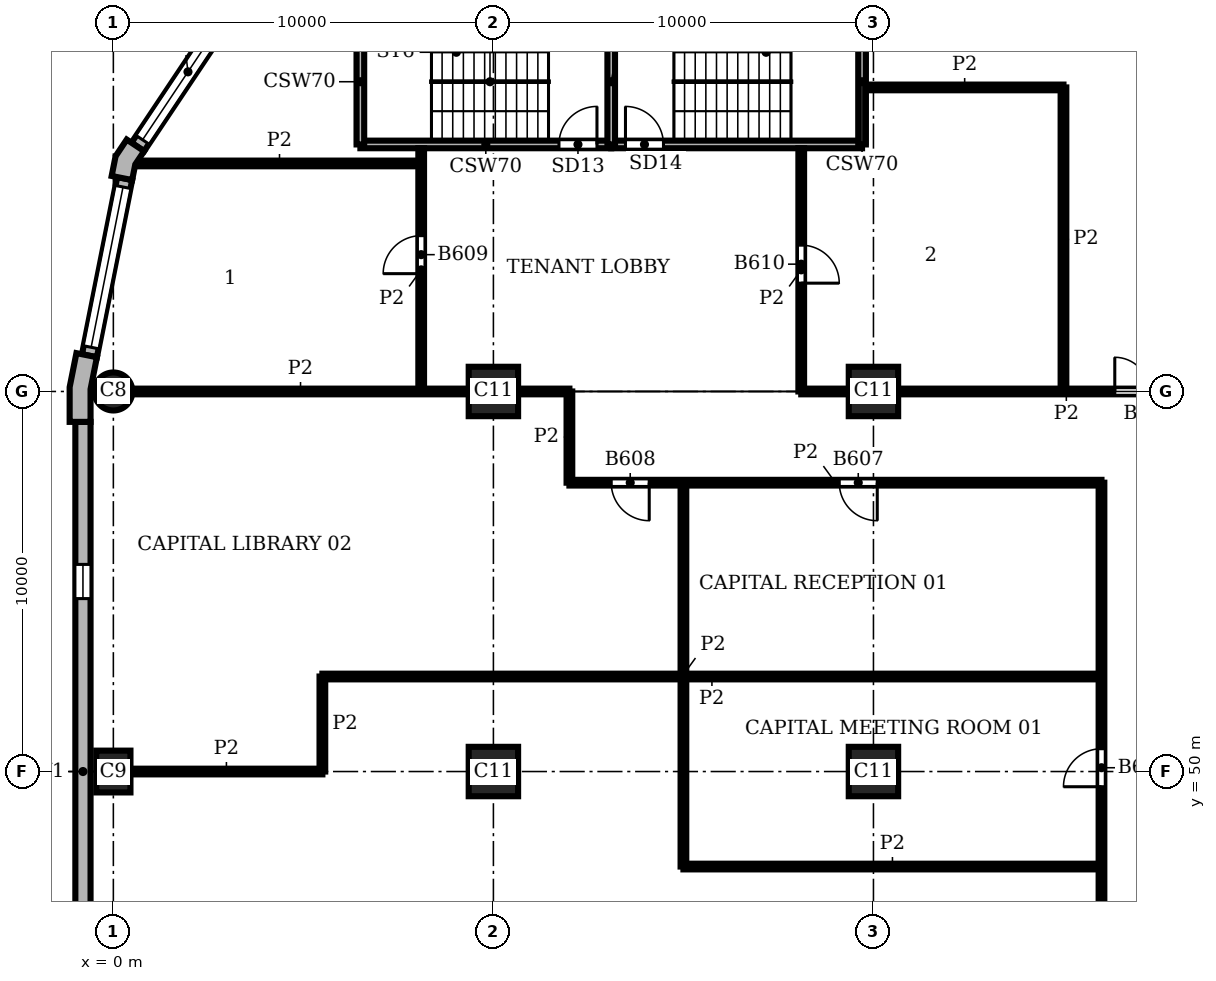
"""IFC4 building model, lengths in metres.
Left out: names, types, materials, properties, quantities, classifications, styles, units other than length and angle.
Written with IfcOpenShell. Run it as: python <this file> out.ifc"""

import sys

from ifc_helpers import new_model, si_unit, direction, frame, frame_2d, origin, origin_2d, place, context, subcontext, project, spatial, polyline, rectangle, circle, outline, extrude, element, fill, save


model = new_model("IFC4")
c1 = context("Model", 3, precision=1e-05, world=origin(), true_north=direction((0.0, 1.0)))
c2 = subcontext(c1, "Body", "Model", "MODEL_VIEW")
j1 = project(units=[si_unit("LENGTHUNIT", "METRE"), si_unit("PLANEANGLEUNIT", "RADIAN")], contexts=[c1])
p1 = place(None, origin())
s1 = spatial("IfcSite", under=j1, at=p1, CompositionType="ELEMENT")
p2 = place(p1, origin())
s2 = spatial("IfcBuilding", under=s1, at=p2, CompositionType="ELEMENT")
p3 = place(p2, frame((0.0, 0.0, 190.2)))
s3 = spatial("IfcBuildingStorey", under=s2, at=p3, CompositionType="ELEMENT", Elevation=190.2)
p4 = place(p3, frame((0.0, 60.0, 0.0), z_axis=(0.0, 0.0, 1.0), x_axis=(1.0, 0.0, 0.0)))
e1 = element("IfcColumn", 1, at=p4, inside=s3, PredefinedType="COLUMN", context=c2, shape_type="SweptSolid", body=[
    extrude(circle(Radius=0.5, at=origin_2d()), origin(), (0.0, 0.0, 1.0), 3.9),
])
p5 = place(p3, frame((0.0, 50.0, 0.0), z_axis=(0.0, 0.0, 1.0), x_axis=(0.0, 1.0, 0.0)))
e2 = element("IfcColumn", 2, at=p5, inside=s3, PredefinedType="COLUMN", context=c2, shape_type="SweptSolid", body=[
    extrude(rectangle(XDim=1.1, YDim=0.9, at=origin_2d()), origin(), (0.0, 0.0, 1.0), 3.9),
])
for number, where, z_axis, x_axis in (
    (3, (10.0, 50.0, 0.0), (0.0, 0.0, 1.0), (1.0, 0.0, 0.0)),
    (4, (10.0, 60.0, 0.0), (0.0, 0.0, 1.0), (1.0, 0.0, 0.0)),
    (5, (20.0, 50.0, 0.0), (0.0, 0.0, 1.0), (1.0, 0.0, 0.0)),
    (6, (20.0, 60.0, 0.0), (0.0, 0.0, 1.0), (1.0, 0.0, 0.0)),
):
    element("IfcColumn", number, at=place(p3, frame(where, z_axis=z_axis, x_axis=x_axis)), inside=s3, PredefinedType="COLUMN", context=c2, shape_type="SweptSolid", body=[
        extrude(rectangle(XDim=1.3, YDim=1.3, at=origin_2d()), origin(), (0.0, 0.0, 1.0), 3.9),
    ])
p6 = place(p3, origin())
e7 = element("IfcWall", 7, at=p6, inside=s3, PredefinedType="SOLIDWALL", context=c2, shape_type="SweptSolid", body=[
    extrude(outline(polyline([(0.477, 66.545), (0.352, 66.629), (0.059, 66.189), (-0.045, 65.67), (0.103, 65.641), (0.495, 65.563), (0.577, 65.974), (0.81, 66.323), (0.477, 66.545)])), origin(), (0.0, 0.0, 1.0), 3.9),
])
e8 = element("IfcWall", 8, at=p6, inside=s3, PredefinedType="SOLIDWALL", context=c2, shape_type="SweptSolid", body=[
    extrude(outline(polyline([(-0.825, 60.98), (-0.972, 61.009), (-1.15, 60.113), (-1.15, 59.2), (-1.0, 59.2), (-0.6, 59.2), (-0.6, 60.059), (-0.432, 60.902), (-0.825, 60.98)])), origin(), (0.0, 0.0, 1.0), 3.9),
])
p7 = place(p3, frame((29.357, 66.434, 0.0), z_axis=(0.0, 0.0, 1.0), x_axis=(-0.555541552266, 0.831488775454, 0.0)))
e9 = element("IfcWall", 9, at=p7, inside=s3, PredefinedType="SOLIDWALL", context=c2, shape_type="SweptSolid", body=[
    extrude(rectangle(XDim=4.753, YDim=0.4, at=frame_2d((2.376, 0.0))), origin(), (0.0, 0.0, 1.0), 3.9),
])
p8 = place(p7, frame((0.226, 0.0, 0.9)))
e10 = element("IfcOpeningElement", 10, at=p8, cuts=e9, PredefinedType="OPENING", context=c2, shape_type="SweptSolid", body=[
    extrude(rectangle(XDim=4.3, YDim=2.35, at=frame_2d((2.15, 1.175))), frame((0.0, 0.21, 0.0), z_axis=(0.0, -1.0, 0.0), x_axis=(1.0, 0.0, 0.0)), (0.0, 0.0, 1.0), 0.42),
])
p9 = place(p3, frame((3.284, 70.386, 0.0), z_axis=(0.0, 0.0, 1.0), x_axis=(-0.555541552266, -0.831488775454, 0.0)))
e11 = element("IfcWall", 11, at=p9, inside=s3, PredefinedType="SOLIDWALL", context=c2, shape_type="SweptSolid", body=[
    extrude(rectangle(XDim=4.753, YDim=0.4, at=frame_2d((2.376, 0.0))), origin(), (0.0, 0.0, 1.0), 3.9),
])
p10 = place(p9, frame((0.226, 0.0, 0.9)))
e12 = element("IfcOpeningElement", 12, at=p10, cuts=e11, PredefinedType="OPENING", context=c2, shape_type="SweptSolid", body=[
    extrude(rectangle(XDim=4.3, YDim=2.35, at=frame_2d((2.15, 1.175))), frame((0.0, 0.21, 0.0), z_axis=(0.0, -1.0, 0.0), x_axis=(1.0, 0.0, 0.0)), (0.0, 0.0, 1.0), 0.42),
])
p11 = place(p3, frame((0.299, 65.602, 0.0), z_axis=(0.0, 0.0, 1.0), x_axis=(-0.195098533057, -0.98078364709, 0.0)))
e13 = element("IfcWall", 13, at=p11, inside=s3, PredefinedType="SOLIDWALL", context=c2, shape_type="SweptSolid", body=[
    extrude(rectangle(XDim=4.753, YDim=0.4, at=frame_2d((2.376, 0.0))), origin(), (0.0, 0.0, 1.0), 3.9),
])
p12 = place(p11, frame((0.226, 0.0, 0.9)))
e14 = element("IfcOpeningElement", 14, at=p12, cuts=e13, PredefinedType="OPENING", context=c2, shape_type="SweptSolid", body=[
    extrude(rectangle(XDim=4.3, YDim=2.35, at=frame_2d((2.15, 1.175))), frame((0.0, 0.21, 0.0), z_axis=(0.0, -1.0, 0.0), x_axis=(1.0, 0.0, 0.0)), (0.0, 0.0, 1.0), 0.42),
])
p13 = place(p3, frame((-0.8, 59.2, 0.0), z_axis=(0.0, 0.0, 1.0), x_axis=(0.0, -1.0, 0.0)))
e15 = element("IfcWall", 15, at=p13, inside=s3, PredefinedType="SOLIDWALL", context=c2, shape_type="SweptSolid", body=[
    extrude(rectangle(XDim=18.4, YDim=0.4, at=frame_2d((9.2, 0.0))), origin(), (0.0, 0.0, 1.0), 3.9),
])
p14 = place(p13, frame((3.75, 0.0, 0.9)))
e16 = element("IfcOpeningElement", 16, at=p14, cuts=e15, PredefinedType="OPENING", context=c2, shape_type="SweptSolid", body=[
    extrude(rectangle(XDim=0.9, YDim=2.35, at=frame_2d((0.45, 1.175))), frame((0.0, 0.21, 0.0), z_axis=(0.0, -1.0, 0.0), x_axis=(1.0, 0.0, 0.0)), (0.0, 0.0, 1.0), 0.42),
])
p15 = place(p13, frame((13.75, 0.0, 0.9)))
e17 = element("IfcOpeningElement", 17, at=p15, cuts=e15, PredefinedType="OPENING", context=c2, shape_type="SweptSolid", body=[
    extrude(rectangle(XDim=0.9, YDim=2.35, at=frame_2d((0.45, 1.175))), frame((0.0, 0.21, 0.0), z_axis=(0.0, -1.0, 0.0), x_axis=(1.0, 0.0, 0.0)), (0.0, 0.0, 1.0), 0.42),
])
p16 = place(p3, frame((6.5, 66.5, 0.0), z_axis=(0.0, 0.0, 1.0), x_axis=(1.0, 0.0, 0.0)))
e18 = element("IfcWall", 18, at=p16, inside=s3, PredefinedType="SHEAR", context=c2, shape_type="SweptSolid", body=[
    extrude(rectangle(XDim=6.6, YDim=0.2, at=frame_2d((3.3, 0.0))), origin(), (0.0, 0.0, 1.0), 3.58),
])
p17 = place(p16, frame((5.225, 0.0, 0.0)))
e19 = element("IfcOpeningElement", 19, at=p17, cuts=e18, PredefinedType="OPENING", context=c2, shape_type="SweptSolid", body=[
    extrude(rectangle(XDim=1.0, YDim=2.1, at=frame_2d((0.5, 1.05))), frame((0.0, 0.11, 0.0), z_axis=(0.0, -1.0, 0.0), x_axis=(1.0, 0.0, 0.0)), (0.0, 0.0, 1.0), 0.22),
])
p18 = place(p3, frame((13.1, 66.5, 0.0), z_axis=(0.0, 0.0, 1.0), x_axis=(1.0, 0.0, 0.0)))
e20 = element("IfcWall", 20, at=p18, inside=s3, PredefinedType="SHEAR", context=c2, shape_type="SweptSolid", body=[
    extrude(rectangle(XDim=6.6, YDim=0.2, at=frame_2d((3.3, 0.0))), origin(), (0.0, 0.0, 1.0), 3.58),
])
p19 = place(p18, frame((0.375, 0.0, 0.0)))
e21 = element("IfcOpeningElement", 21, at=p19, cuts=e20, PredefinedType="OPENING", context=c2, shape_type="SweptSolid", body=[
    extrude(rectangle(XDim=1.0, YDim=2.1, at=frame_2d((0.5, 1.05))), frame((0.0, 0.11, 0.0), z_axis=(0.0, -1.0, 0.0), x_axis=(1.0, 0.0, 0.0)), (0.0, 0.0, 1.0), 0.22),
])
for number, where, z_axis, x_axis in (
    (22, (6.5, 66.5, 0.0), (0.0, 0.0, 1.0), (0.0, 1.0, 0.0)),
    (23, (13.1, 66.5, 0.0), (0.0, 0.0, 1.0), (0.0, 1.0, 0.0)),
    (24, (19.7, 66.5, 0.0), (0.0, 0.0, 1.0), (0.0, 1.0, 0.0)),
):
    element("IfcWall", number, at=place(p3, frame(where, z_axis=z_axis, x_axis=x_axis)), inside=s3, PredefinedType="SHEAR", context=c2, shape_type="SweptSolid", body=[
        extrude(rectangle(XDim=3.3, YDim=0.2, at=frame_2d((1.65, 0.0))), origin(), (0.0, 0.0, 1.0), 3.58),
    ])
p20 = place(p3, frame((5.5, 50.0, 0.0), z_axis=(0.0, 0.0, 1.0), x_axis=(0.0, 1.0, 0.0)))
e25 = element("IfcWall", 25, at=p20, inside=s3, PredefinedType="PARTITIONING", context=c2, shape_type="SweptSolid", body=[
    extrude(rectangle(XDim=2.5, YDim=0.15, at=frame_2d((1.25, 0.0))), origin(), (0.0, 0.0, 1.0), 3.58),
])
p21 = place(p3, frame((8.1, 60.0, 0.0), z_axis=(0.0, 0.0, 1.0), x_axis=(0.0, 1.0, 0.0)))
e26 = element("IfcWall", 26, at=p21, inside=s3, PredefinedType="PARTITIONING", context=c2, shape_type="SweptSolid", body=[
    extrude(rectangle(XDim=6.4, YDim=0.15, at=frame_2d((3.2, 0.0))), origin(), (0.0, 0.0, 1.0), 3.58),
])
p22 = place(p21, frame((3.1, 0.0, 0.0)))
e27 = element("IfcOpeningElement", 27, at=p22, cuts=e26, PredefinedType="OPENING", context=c2, shape_type="SweptSolid", body=[
    extrude(rectangle(XDim=1.0, YDim=2.1, at=frame_2d((0.5, 1.05))), frame((0.0, 0.085, 0.0), z_axis=(0.0, -1.0, 0.0), x_axis=(1.0, 0.0, 0.0)), (0.0, 0.0, 1.0), 0.17),
])
p23 = place(p3, frame((12.0, 57.6, 0.0), z_axis=(0.0, 0.0, 1.0), x_axis=(0.0, 1.0, 0.0)))
e28 = element("IfcWall", 28, at=p23, inside=s3, PredefinedType="PARTITIONING", context=c2, shape_type="SweptSolid", body=[
    extrude(rectangle(XDim=2.4, YDim=0.15, at=frame_2d((1.2, 0.0))), origin(), (0.0, 0.0, 1.0), 3.58),
])
p24 = place(p3, frame((15.0, 47.5, 0.0), z_axis=(0.0, 0.0, 1.0), x_axis=(0.0, 1.0, 0.0)))
e29 = element("IfcWall", 29, at=p24, inside=s3, PredefinedType="PARTITIONING", context=c2, shape_type="SweptSolid", body=[
    extrude(rectangle(XDim=10.1, YDim=0.15, at=frame_2d((5.05, 0.0))), origin(), (0.0, 0.0, 1.0), 3.58),
])
p25 = place(p3, frame((18.1, 60.0, 0.0), z_axis=(0.0, 0.0, 1.0), x_axis=(0.0, 1.0, 0.0)))
e30 = element("IfcWall", 30, at=p25, inside=s3, PredefinedType="PARTITIONING", context=c2, shape_type="SweptSolid", body=[
    extrude(rectangle(XDim=6.4, YDim=0.15, at=frame_2d((3.2, 0.0))), origin(), (0.0, 0.0, 1.0), 3.58),
])
p26 = place(p25, frame((2.85, 0.0, 0.0)))
e31 = element("IfcOpeningElement", 31, at=p26, cuts=e30, PredefinedType="OPENING", context=c2, shape_type="SweptSolid", body=[
    extrude(rectangle(XDim=1.0, YDim=2.1, at=frame_2d((0.5, 1.05))), frame((0.0, 0.085, 0.0), z_axis=(0.0, -1.0, 0.0), x_axis=(1.0, 0.0, 0.0)), (0.0, 0.0, 1.0), 0.17),
])
p27 = place(p3, frame((25.0, 60.0, 0.0), z_axis=(0.0, 0.0, 1.0), x_axis=(0.0, 1.0, 0.0)))
e32 = element("IfcWall", 32, at=p27, inside=s3, PredefinedType="PARTITIONING", context=c2, shape_type="SweptSolid", body=[
    extrude(rectangle(XDim=8.0, YDim=0.15, at=frame_2d((4.0, 0.0))), origin(), (0.0, 0.0, 1.0), 3.58),
])
p28 = place(p3, frame((26.0, 28.0, 0.0), z_axis=(0.0, 0.0, 1.0), x_axis=(0.0, 1.0, 0.0)))
e33 = element("IfcWall", 33, at=p28, inside=s3, PredefinedType="PARTITIONING", context=c2, shape_type="SweptSolid", body=[
    extrude(rectangle(XDim=29.6, YDim=0.15, at=frame_2d((14.8, 0.0))), origin(), (0.0, 0.0, 1.0), 3.58),
])
p29 = place(p28, frame((2.85, 0.0, 0.0)))
e34 = element("IfcOpeningElement", 34, at=p29, cuts=e33, PredefinedType="OPENING", context=c2, shape_type="SweptSolid", body=[
    extrude(rectangle(XDim=1.8, YDim=2.1, at=frame_2d((0.9, 1.05))), frame((0.0, 0.085, 0.0), z_axis=(0.0, -1.0, 0.0), x_axis=(1.0, 0.0, 0.0)), (0.0, 0.0, 1.0), 0.17),
])
p30 = place(p28, frame((12.6, 0.0, 0.0)))
e35 = element("IfcOpeningElement", 35, at=p30, cuts=e33, PredefinedType="OPENING", context=c2, shape_type="SweptSolid", body=[
    extrude(rectangle(XDim=1.8, YDim=2.1, at=frame_2d((0.9, 1.05))), frame((0.0, 0.085, 0.0), z_axis=(0.0, -1.0, 0.0), x_axis=(1.0, 0.0, 0.0)), (0.0, 0.0, 1.0), 0.17),
])
p31 = place(p28, frame((21.6, 0.0, 0.0)))
e36 = element("IfcOpeningElement", 36, at=p31, cuts=e33, PredefinedType="OPENING", context=c2, shape_type="SweptSolid", body=[
    extrude(rectangle(XDim=1.0, YDim=2.1, at=frame_2d((0.5, 1.05))), frame((0.0, 0.085, 0.0), z_axis=(0.0, -1.0, 0.0), x_axis=(1.0, 0.0, 0.0)), (0.0, 0.0, 1.0), 0.17),
])
p32 = place(p3, frame((15.0, 47.5, 0.0), z_axis=(0.0, 0.0, 1.0), x_axis=(1.0, 0.0, 0.0)))
e37 = element("IfcWall", 37, at=p32, inside=s3, PredefinedType="PARTITIONING", context=c2, shape_type="SweptSolid", body=[
    extrude(rectangle(XDim=11.0, YDim=0.15, at=frame_2d((5.5, 0.0))), origin(), (0.0, 0.0, 1.0), 3.58),
])
p33 = place(p3, frame((0.45, 50.0, 0.0), z_axis=(0.0, 0.0, 1.0), x_axis=(1.0, 0.0, 0.0)))
e38 = element("IfcWall", 38, at=p33, inside=s3, PredefinedType="PARTITIONING", context=c2, shape_type="SweptSolid", body=[
    extrude(rectangle(XDim=5.05, YDim=0.15, at=frame_2d((2.525, 0.0))), origin(), (0.0, 0.0, 1.0), 3.58),
])
p34 = place(p3, frame((5.5, 52.5, 0.0), z_axis=(0.0, 0.0, 1.0), x_axis=(1.0, 0.0, 0.0)))
e39 = element("IfcWall", 39, at=p34, inside=s3, PredefinedType="PARTITIONING", context=c2, shape_type="SweptSolid", body=[
    extrude(rectangle(XDim=20.5, YDim=0.15, at=frame_2d((10.25, 0.0))), origin(), (0.0, 0.0, 1.0), 3.58),
])
p35 = place(p3, frame((12.0, 57.6, 0.0), z_axis=(0.0, 0.0, 1.0), x_axis=(1.0, 0.0, 0.0)))
e40 = element("IfcWall", 40, at=p35, inside=s3, PredefinedType="PARTITIONING", context=c2, shape_type="SweptSolid", body=[
    extrude(rectangle(XDim=14.0, YDim=0.15, at=frame_2d((7.0, 0.0))), origin(), (0.0, 0.0, 1.0), 3.58),
])
p36 = place(p35, frame((7.1, 0.0, 0.0)))
e41 = element("IfcOpeningElement", 41, at=p36, cuts=e40, PredefinedType="OPENING", context=c2, shape_type="SweptSolid", body=[
    extrude(rectangle(XDim=1.0, YDim=2.1, at=frame_2d((0.5, 1.05))), frame((0.0, 0.085, 0.0), z_axis=(0.0, -1.0, 0.0), x_axis=(1.0, 0.0, 0.0)), (0.0, 0.0, 1.0), 0.17),
])
p37 = place(p35, frame((1.1, 0.0, 0.0)))
e42 = element("IfcOpeningElement", 42, at=p37, cuts=e40, PredefinedType="OPENING", context=c2, shape_type="SweptSolid", body=[
    extrude(rectangle(XDim=1.0, YDim=2.1, at=frame_2d((0.5, 1.05))), frame((0.0, 0.085, 0.0), z_axis=(0.0, -1.0, 0.0), x_axis=(1.0, 0.0, 0.0)), (0.0, 0.0, 1.0), 0.17),
])
p38 = place(p3, frame((0.5, 60.0, 0.0), z_axis=(0.0, 0.0, 1.0), x_axis=(1.0, 0.0, 0.0)))
e43 = element("IfcWall", 43, at=p38, inside=s3, PredefinedType="PARTITIONING", context=c2, shape_type="SweptSolid", body=[
    extrude(rectangle(XDim=8.85, YDim=0.15, at=frame_2d((4.425, 0.0))), origin(), (0.0, 0.0, 1.0), 3.58),
])
p39 = place(p3, frame((10.65, 60.0, 0.0), z_axis=(0.0, 0.0, 1.0), x_axis=(1.0, 0.0, 0.0)))
e44 = element("IfcWall", 44, at=p39, inside=s3, PredefinedType="PARTITIONING", context=c2, shape_type="SweptSolid", body=[
    extrude(rectangle(XDim=1.35, YDim=0.15, at=frame_2d((0.675, 0.0))), origin(), (0.0, 0.0, 1.0), 3.58),
])
p40 = place(p3, frame((18.1, 60.0, 0.0), z_axis=(0.0, 0.0, 1.0), x_axis=(1.0, 0.0, 0.0)))
e45 = element("IfcWall", 45, at=p40, inside=s3, PredefinedType="PARTITIONING", context=c2, shape_type="SweptSolid", body=[
    extrude(rectangle(XDim=1.25, YDim=0.15, at=frame_2d((0.625, 0.0))), origin(), (0.0, 0.0, 1.0), 3.58),
])
p41 = place(p3, frame((20.65, 60.0, 0.0), z_axis=(0.0, 0.0, 1.0), x_axis=(1.0, 0.0, 0.0)))
e46 = element("IfcWall", 46, at=p41, inside=s3, PredefinedType="PARTITIONING", context=c2, shape_type="SweptSolid", body=[
    extrude(rectangle(XDim=8.85, YDim=0.15, at=frame_2d((4.425, 0.0))), origin(), (0.0, 0.0, 1.0), 3.58),
])
p42 = place(p41, frame((5.7, 0.0, 0.0)))
e47 = element("IfcOpeningElement", 47, at=p42, cuts=e46, PredefinedType="OPENING", context=c2, shape_type="SweptSolid", body=[
    extrude(rectangle(XDim=1.8, YDim=2.1, at=frame_2d((0.9, 1.05))), frame((0.0, 0.085, 0.0), z_axis=(0.0, -1.0, 0.0), x_axis=(1.0, 0.0, 0.0)), (0.0, 0.0, 1.0), 0.17),
])
p43 = place(p3, frame((0.644, 66.0, 0.0), z_axis=(0.0, 0.0, 1.0), x_axis=(1.0, 0.0, 0.0)))
e48 = element("IfcWall", 48, at=p43, inside=s3, PredefinedType="PARTITIONING", context=c2, shape_type="SweptSolid", body=[
    extrude(rectangle(XDim=7.456, YDim=0.15, at=frame_2d((3.728, 0.0))), origin(), (0.0, 0.0, 1.0), 3.58),
])
p44 = place(p3, frame((19.8, 68.0, 0.0), z_axis=(0.0, 0.0, 1.0), x_axis=(1.0, 0.0, 0.0)))
e49 = element("IfcWall", 49, at=p44, inside=s3, PredefinedType="PARTITIONING", context=c2, shape_type="SweptSolid", body=[
    extrude(rectangle(XDim=5.2, YDim=0.15, at=frame_2d((2.6, 0.0))), origin(), (0.0, 0.0, 1.0), 3.58),
])
p45 = place(p8, origin())
e50 = element("IfcWindow", 50, at=p45, inside=s3, PartitioningType="SINGLE_PANEL", PredefinedType="WINDOW", context=c2, shape_type="SweptSolid", body=[
    extrude(rectangle(XDim=4.3, YDim=2.35, at=frame_2d((2.15, 1.175))), frame((0.0, 0.16, 0.0), z_axis=(0.0, -1.0, 0.0), x_axis=(1.0, 0.0, 0.0)), (0.0, 0.0, 1.0), 0.06),
])
fill(e10, e50)
p46 = place(p10, origin())
e51 = element("IfcWindow", 51, at=p46, inside=s3, PartitioningType="SINGLE_PANEL", PredefinedType="WINDOW", context=c2, shape_type="SweptSolid", body=[
    extrude(rectangle(XDim=4.3, YDim=2.35, at=frame_2d((2.15, 1.175))), frame((0.0, 0.16, 0.0), z_axis=(0.0, -1.0, 0.0), x_axis=(1.0, 0.0, 0.0)), (0.0, 0.0, 1.0), 0.06),
])
fill(e12, e51)
p47 = place(p12, origin())
e52 = element("IfcWindow", 52, at=p47, inside=s3, PartitioningType="SINGLE_PANEL", PredefinedType="WINDOW", context=c2, shape_type="SweptSolid", body=[
    extrude(rectangle(XDim=4.3, YDim=2.35, at=frame_2d((2.15, 1.175))), frame((0.0, 0.16, 0.0), z_axis=(0.0, -1.0, 0.0), x_axis=(1.0, 0.0, 0.0)), (0.0, 0.0, 1.0), 0.06),
])
fill(e14, e52)
p48 = place(p14, origin())
e53 = element("IfcWindow", 53, at=p48, inside=s3, PartitioningType="SINGLE_PANEL", PredefinedType="WINDOW", context=c2, shape_type="SweptSolid", body=[
    extrude(rectangle(XDim=0.9, YDim=2.35, at=frame_2d((0.45, 1.175))), frame((0.0, 0.16, 0.0), z_axis=(0.0, -1.0, 0.0), x_axis=(1.0, 0.0, 0.0)), (0.0, 0.0, 1.0), 0.06),
])
fill(e16, e53)
p49 = place(p17, origin())
e54 = element("IfcDoor", 54, at=p49, inside=s3, OperationType="SINGLE_SWING_RIGHT", PredefinedType="DOOR", context=c2, shape_type="SweptSolid", body=[
    extrude(rectangle(XDim=1.0, YDim=2.1, at=frame_2d((0.5, 1.05))), frame((0.0, 0.025, 0.0), z_axis=(0.0, -1.0, 0.0), x_axis=(1.0, 0.0, 0.0)), (0.0, 0.0, 1.0), 0.05),
])
fill(e19, e54)
p50 = place(p19, origin())
e55 = element("IfcDoor", 55, at=p50, inside=s3, OperationType="SINGLE_SWING_LEFT", PredefinedType="DOOR", context=c2, shape_type="SweptSolid", body=[
    extrude(rectangle(XDim=1.0, YDim=2.1, at=frame_2d((0.5, 1.05))), frame((0.0, 0.025, 0.0), z_axis=(0.0, -1.0, 0.0), x_axis=(1.0, 0.0, 0.0)), (0.0, 0.0, 1.0), 0.05),
])
fill(e21, e55)
p51 = place(p31, origin())
e56 = element("IfcDoor", 56, at=p51, inside=s3, OperationType="SINGLE_SWING_LEFT", PredefinedType="DOOR", context=c2, shape_type="SweptSolid", body=[
    extrude(rectangle(XDim=1.0, YDim=2.1, at=frame_2d((0.5, 1.05))), frame((0.0, 0.025, 0.0), z_axis=(0.0, -1.0, 0.0), x_axis=(1.0, 0.0, 0.0)), (0.0, 0.0, 1.0), 0.05),
])
fill(e36, e56)
p52 = place(p36, frame((1.0, 0.0, 0.0), z_axis=(0.0, 0.0, 1.0), x_axis=(-1.0, 0.0, 0.0)))
e57 = element("IfcDoor", 57, at=p52, inside=s3, OperationType="SINGLE_SWING_LEFT", PredefinedType="DOOR", context=c2, shape_type="SweptSolid", body=[
    extrude(rectangle(XDim=1.0, YDim=2.1, at=frame_2d((0.5, 1.05))), frame((0.0, 0.025, 0.0), z_axis=(0.0, -1.0, 0.0), x_axis=(1.0, 0.0, 0.0)), (0.0, 0.0, 1.0), 0.05),
])
fill(e41, e57)
p53 = place(p37, frame((1.0, 0.0, 0.0), z_axis=(0.0, 0.0, 1.0), x_axis=(-1.0, 0.0, 0.0)))
e58 = element("IfcDoor", 58, at=p53, inside=s3, OperationType="SINGLE_SWING_LEFT", PredefinedType="DOOR", context=c2, shape_type="SweptSolid", body=[
    extrude(rectangle(XDim=1.0, YDim=2.1, at=frame_2d((0.5, 1.05))), frame((0.0, 0.025, 0.0), z_axis=(0.0, -1.0, 0.0), x_axis=(1.0, 0.0, 0.0)), (0.0, 0.0, 1.0), 0.05),
])
fill(e42, e58)
p54 = place(p22, origin())
e59 = element("IfcDoor", 59, at=p54, inside=s3, OperationType="SINGLE_SWING_LEFT", PredefinedType="DOOR", context=c2, shape_type="SweptSolid", body=[
    extrude(rectangle(XDim=1.0, YDim=2.1, at=frame_2d((0.5, 1.05))), frame((0.0, 0.025, 0.0), z_axis=(0.0, -1.0, 0.0), x_axis=(1.0, 0.0, 0.0)), (0.0, 0.0, 1.0), 0.05),
])
fill(e27, e59)
p55 = place(p26, frame((1.0, 0.0, 0.0), z_axis=(0.0, 0.0, 1.0), x_axis=(-1.0, 0.0, 0.0)))
e60 = element("IfcDoor", 60, at=p55, inside=s3, OperationType="SINGLE_SWING_RIGHT", PredefinedType="DOOR", context=c2, shape_type="SweptSolid", body=[
    extrude(rectangle(XDim=1.0, YDim=2.1, at=frame_2d((0.5, 1.05))), frame((0.0, 0.025, 0.0), z_axis=(0.0, -1.0, 0.0), x_axis=(1.0, 0.0, 0.0)), (0.0, 0.0, 1.0), 0.05),
])
fill(e31, e60)
p56 = place(p42, origin())
e61 = element("IfcDoor", 61, at=p56, inside=s3, OperationType="DOUBLE_DOOR_SINGLE_SWING", PredefinedType="DOOR", context=c2, shape_type="SweptSolid", body=[
    extrude(rectangle(XDim=1.8, YDim=2.1, at=frame_2d((0.9, 1.05))), frame((0.0, 0.025, 0.0), z_axis=(0.0, -1.0, 0.0), x_axis=(1.0, 0.0, 0.0)), (0.0, 0.0, 1.0), 0.05),
])
fill(e47, e61)
save(model, sys.argv[1])
